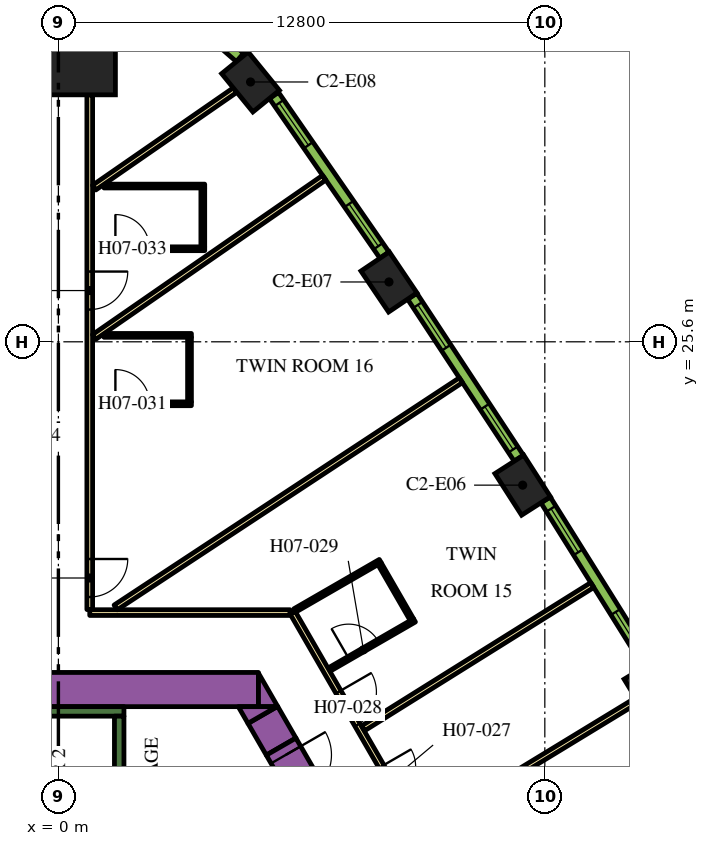
"""IFC4 building model, lengths in metres.
Left out: names, types, materials, properties, quantities, classifications, styles, units other than length and angle.
Written with IfcOpenShell. Run it as: python <this file> out.ifc"""

import sys

from ifc_helpers import new_model, si_unit, direction, frame, frame_2d, origin, origin_2d, place, context, subcontext, project, spatial, polyline, rectangle, outline, extrude, element, fill, save


model = new_model("IFC4")
c1 = context("Model", 3, precision=1e-05, world=origin(), true_north=direction((0.0, 1.0)))
c2 = subcontext(c1, "Body", "Model", "MODEL_VIEW")
j1 = project(units=[si_unit("LENGTHUNIT", "METRE"), si_unit("PLANEANGLEUNIT", "RADIAN")], contexts=[c1])
p1 = place(None, origin())
s1 = spatial("IfcSite", under=j1, at=p1, CompositionType="ELEMENT")
p2 = place(p1, origin())
s2 = spatial("IfcBuilding", under=s1, at=p2, CompositionType="ELEMENT")
p3 = place(p2, frame((0.0, 0.0, 103.2)))
s3 = spatial("IfcBuildingStorey", under=s2, at=p3, CompositionType="ELEMENT", Elevation=103.2)
p4 = place(p3, frame((0.0, 33.598, 0.0), z_axis=(0.0, 0.0, 1.0), x_axis=(0.0, 1.0, 0.0)))
e1 = element("IfcColumn", 1, at=p4, inside=s3, PredefinedType="COLUMN", context=c2, shape_type="SweptSolid", body=[
    extrude(rectangle(XDim=3.0, YDim=3.0, at=origin_2d()), origin(), (0.0, 0.0, 1.0), 3.9),
])
for number, where, z_axis, x_axis in (
    (2, (15.609, 16.402, 0.0), (0.0, 0.0, 1.0), (-0.52, 0.854, 0.0)),
    (3, (12.217, 21.828, 0.0), (0.0, 0.0, 1.0), (-0.54, 0.842, 0.0)),
    (4, (8.699, 27.174, 0.0), (0.0, 0.0, 1.0), (-0.559, 0.829, 0.0)),
    (5, (5.056, 32.437, 0.0), (0.0, 0.0, 1.0), (-0.632, 0.775, 0.0)),
):
    element("IfcColumn", number, at=place(p3, frame(where, z_axis=z_axis, x_axis=x_axis)), inside=s3, PredefinedType="COLUMN", context=c2, shape_type="SweptSolid", body=[
        extrude(rectangle(XDim=1.3, YDim=0.9, at=origin_2d()), origin(), (0.0, 0.0, 1.0), 3.9),
    ])
p5 = place(p3, frame((-4.224, 16.45, 0.0), z_axis=(0.0, 0.0, 1.0), x_axis=(1.0, 0.0, 0.0)))
e6 = element("IfcWall", 6, at=p5, inside=s3, PredefinedType="SOLIDWALL", context=c2, shape_type="SweptSolid", body=[
    extrude(rectangle(XDim=9.488, YDim=0.9, at=frame_2d((4.744, 0.0))), origin(), (0.0, 0.0, 1.0), 3.9),
])
p6 = place(p3, origin())
e7 = element("IfcWall", 7, at=p6, inside=s3, PredefinedType="SOLIDWALL", context=c2, shape_type="SweptSolid", body=[
    extrude(outline(polyline([(5.265, 16.0), (5.265, 16.88), (5.773, 16.0), (5.265, 16.0)])), origin(), (0.0, 0.0, 1.0), 3.9),
])
p7 = place(p3, frame((5.861, 14.949, 0.0), z_axis=(0.0, 0.0, 1.0), x_axis=(-0.50011719232, 0.865957732194, 0.0)))
e8 = element("IfcWall", 8, at=p7, inside=s3, PredefinedType="SOLIDWALL", context=c2, shape_type="SweptSolid", body=[
    extrude(rectangle(XDim=0.964, YDim=0.9, at=frame_2d((0.482, 0.0))), origin(), (0.0, 0.0, 1.0), 3.9),
])
e9 = element("IfcWall", 9, at=p6, inside=s3, PredefinedType="SOLIDWALL", context=c2, shape_type="SweptSolid", body=[
    extrude(outline(polyline([(4.734, 16.0), (5.75, 16.0), (4.988, 15.56), (4.734, 16.0)])), origin(), (0.0, 0.0, 1.0), 3.9),
])
p8 = place(p3, frame((-1.725, 15.875, 0.0), z_axis=(0.0, 0.0, 1.0), x_axis=(1.0, 0.0, 0.0)))
e10 = element("IfcWall", 10, at=p8, inside=s3, PredefinedType="SOLIDWALL", context=c2, shape_type="SweptSolid", body=[
    extrude(rectangle(XDim=3.45, YDim=0.25, at=frame_2d((1.725, 0.0))), origin(), (0.0, 0.0, 1.0), 3.9),
])
p9 = place(p3, frame((1.6, 8.95, 0.0), z_axis=(0.0, 0.0, 1.0), x_axis=(0.0, 1.0, 0.0)))
e11 = element("IfcWall", 11, at=p9, inside=s3, PredefinedType="SOLIDWALL", context=c2, shape_type="SweptSolid", body=[
    extrude(rectangle(XDim=6.8, YDim=0.25, at=frame_2d((3.4, 0.0))), origin(), (0.0, 0.0, 1.0), 3.9),
])
p10 = place(p3, frame((5.861, 14.948, 0.0), z_axis=(0.0, 0.0, 1.0), x_axis=(0.500062241894, -0.865989465428, 0.0)))
e12 = element("IfcWall", 12, at=p10, inside=s3, PredefinedType="SOLIDWALL", context=c2, shape_type="SweptSolid", body=[
    extrude(rectangle(XDim=1.7, YDim=0.9, at=frame_2d((0.85, 0.0))), origin(), (0.0, 0.0, 1.0), 3.9),
])
p11 = place(p10, frame((0.25, 0.0, 0.0)))
e13 = element("IfcOpeningElement", 13, at=p11, cuts=e12, PredefinedType="OPENING", context=c2, shape_type="SweptSolid", body=[
    extrude(rectangle(XDim=1.2, YDim=2.1, at=frame_2d((0.6, 1.05))), frame((0.0, 0.46, 0.0), z_axis=(0.0, -1.0, 0.0), x_axis=(1.0, 0.0, 0.0)), (0.0, 0.0, 1.0), 0.92),
])
p12 = place(p3, frame((6.163, 18.475, 0.0), z_axis=(0.0, 0.0, 1.0), x_axis=(0.500001317485, -0.866024643133, 0.0)))
e14 = element("IfcWall", 14, at=p12, inside=s3, PredefinedType="PARTITIONING", context=c2, shape_type="SweptSolid", body=[
    extrude(rectangle(XDim=25.767, YDim=0.15, at=frame_2d((12.883, 0.0))), origin(), (0.0, 0.0, 1.0), 2.75),
])
p13 = place(p12, frame((24.241, 0.0, 0.0)))
e15 = element("IfcOpeningElement", 15, at=p13, cuts=e14, PredefinedType="OPENING", context=c2, shape_type="SweptSolid", body=[
    extrude(rectangle(XDim=1.0, YDim=2.1, at=frame_2d((0.5, 1.05))), frame((0.0, 0.085, 0.0), z_axis=(0.0, -1.0, 0.0), x_axis=(1.0, 0.0, 0.0)), (0.0, 0.0, 1.0), 0.17),
])
p14 = place(p12, frame((13.144, 0.0, 0.0)))
e16 = element("IfcOpeningElement", 16, at=p14, cuts=e14, PredefinedType="OPENING", context=c2, shape_type="SweptSolid", body=[
    extrude(rectangle(XDim=1.0, YDim=2.1, at=frame_2d((0.5, 1.05))), frame((0.0, 0.085, 0.0), z_axis=(0.0, -1.0, 0.0), x_axis=(1.0, 0.0, 0.0)), (0.0, 0.0, 1.0), 0.17),
])
p15 = place(p12, frame((11.592, 0.0, 0.0)))
e17 = element("IfcOpeningElement", 17, at=p15, cuts=e14, PredefinedType="OPENING", context=c2, shape_type="SweptSolid", body=[
    extrude(rectangle(XDim=1.1, YDim=2.1, at=frame_2d((0.55, 1.05))), frame((0.0, 0.085, 0.0), z_axis=(0.0, -1.0, 0.0), x_axis=(1.0, 0.0, 0.0)), (0.0, 0.0, 1.0), 0.17),
])
p16 = place(p12, frame((4.674, 0.0, 0.0)))
e18 = element("IfcOpeningElement", 18, at=p16, cuts=e14, PredefinedType="OPENING", context=c2, shape_type="SweptSolid", body=[
    extrude(rectangle(XDim=0.9, YDim=2.1, at=frame_2d((0.45, 1.05))), frame((0.0, 0.085, 0.0), z_axis=(0.0, -1.0, 0.0), x_axis=(1.0, 0.0, 0.0)), (0.0, 0.0, 1.0), 0.17),
])
p17 = place(p12, frame((2.411, 0.0, 0.0)))
e19 = element("IfcOpeningElement", 19, at=p17, cuts=e14, PredefinedType="OPENING", context=c2, shape_type="SweptSolid", body=[
    extrude(rectangle(XDim=1.0, YDim=2.1, at=frame_2d((0.5, 1.05))), frame((0.0, 0.085, 0.0), z_axis=(0.0, -1.0, 0.0), x_axis=(1.0, 0.0, 0.0)), (0.0, 0.0, 1.0), 0.17),
])
p18 = place(p3, frame((0.825, 18.475, 0.0), z_axis=(0.0, 0.0, 1.0), x_axis=(1.0, 0.0, 0.0)))
e20 = element("IfcWall", 20, at=p18, inside=s3, PredefinedType="PARTITIONING", context=c2, shape_type="SweptSolid", body=[
    extrude(rectangle(XDim=5.268, YDim=0.15, at=frame_2d((2.634, 0.0))), origin(), (0.0, 0.0, 1.0), 2.75),
])
p19 = place(p3, frame((0.825, 32.098, 0.0), z_axis=(0.0, 0.0, 1.0), x_axis=(0.0, -1.0, 0.0)))
e21 = element("IfcWall", 21, at=p19, inside=s3, PredefinedType="PARTITIONING", context=c2, shape_type="SweptSolid", body=[
    extrude(rectangle(XDim=13.543, YDim=0.15, at=frame_2d((6.772, 0.0))), origin(), (0.0, 0.0, 1.0), 2.75),
])
p20 = place(p19, frame((12.213, 0.0, 0.0)))
e22 = element("IfcOpeningElement", 22, at=p20, cuts=e21, PredefinedType="OPENING", context=c2, shape_type="SweptSolid", body=[
    extrude(rectangle(XDim=1.0, YDim=2.1, at=frame_2d((0.5, 1.05))), frame((0.0, 0.085, 0.0), z_axis=(0.0, -1.0, 0.0), x_axis=(1.0, 0.0, 0.0)), (0.0, 0.0, 1.0), 0.17),
])
p21 = place(p19, frame((4.65, 0.0, 0.0)))
e23 = element("IfcOpeningElement", 23, at=p21, cuts=e21, PredefinedType="OPENING", context=c2, shape_type="SweptSolid", body=[
    extrude(rectangle(XDim=1.0, YDim=2.1, at=frame_2d((0.5, 1.05))), frame((0.0, 0.085, 0.0), z_axis=(0.0, -1.0, 0.0), x_axis=(1.0, 0.0, 0.0)), (0.0, 0.0, 1.0), 0.17),
])
p22 = place(p3, frame((6.994, 29.917, 0.0), z_axis=(0.0, 0.0, 1.0), x_axis=(-0.822255462494, -0.569118576747, 0.0)))
e24 = element("IfcWall", 24, at=p22, inside=s3, PredefinedType="PARTITIONING", context=c2, shape_type="SweptSolid", body=[
    extrude(rectangle(XDim=7.362, YDim=0.15, at=frame_2d((3.681, 0.0))), origin(), (0.0, 0.0, 1.0), 2.75),
])
p23 = place(p3, frame((10.592, 24.589, 0.0), z_axis=(0.0, 0.0, 1.0), x_axis=(-0.835337323748, -0.549737715236, 0.0)))
e25 = element("IfcWall", 25, at=p23, inside=s3, PredefinedType="PARTITIONING", context=c2, shape_type="SweptSolid", body=[
    extrude(rectangle(XDim=10.875, YDim=0.15, at=frame_2d((5.438, 0.0))), origin(), (0.0, 0.0, 1.0), 2.75),
])
p24 = place(p3, frame((4.649, 32.223, 0.0), z_axis=(0.0, 0.0, 1.0), x_axis=(-0.822262349475, -0.569108626394, 0.0)))
e26 = element("IfcWall", 26, at=p24, inside=s3, PredefinedType="PARTITIONING", context=c2, shape_type="SweptSolid", body=[
    extrude(rectangle(XDim=4.51, YDim=0.15, at=frame_2d((2.255, 0.0))), origin(), (0.0, 0.0, 1.0), 2.75),
])
p25 = place(p3, frame((14.049, 19.2, 0.0), z_axis=(0.0, 0.0, 1.0), x_axis=(-0.847955867271, -0.530066832731, 0.0)))
e27 = element("IfcWall", 27, at=p25, inside=s3, PredefinedType="PARTITIONING", context=c2, shape_type="SweptSolid", body=[
    extrude(rectangle(XDim=7.111, YDim=0.15, at=frame_2d((3.556, 0.0))), origin(), (0.0, 0.0, 1.0), 2.75),
])
p26 = place(p3, frame((15.225, 16.167, 0.0), z_axis=(0.0, 0.0, 1.0), x_axis=(-0.854088713274, -0.520127359266, 0.0)))
e28 = element("IfcWall", 28, at=p26, inside=s3, PredefinedType="PARTITIONING", context=c2, shape_type="SweptSolid", body=[
    extrude(rectangle(XDim=6.611, YDim=0.15, at=frame_2d((3.305, 0.0))), origin(), (0.0, 0.0, 1.0), 2.75),
])
p27 = place(p3, frame((7.118, 16.971, 0.0), z_axis=(0.0, 0.0, 1.0), x_axis=(0.866021400173, 0.500006934395, 0.0)))
e29 = element("IfcWall", 29, at=p27, inside=s3, PredefinedType="PARTITIONING", context=c2, shape_type="SweptSolid", body=[
    extrude(rectangle(XDim=2.6, YDim=0.1, at=frame_2d((1.3, 0.0))), origin(), (0.0, 0.0, 1.0), 2.75),
])
p28 = place(p27, frame((0.6, 0.0, 0.0)))
e30 = element("IfcOpeningElement", 30, at=p28, cuts=e29, PredefinedType="OPENING", context=c2, shape_type="SweptSolid", body=[
    extrude(rectangle(XDim=0.9, YDim=2.1, at=frame_2d((0.45, 1.05))), frame((0.0, 0.06, 0.0), z_axis=(0.0, -1.0, 0.0), x_axis=(1.0, 0.0, 0.0)), (0.0, 0.0, 1.0), 0.12),
])
p29 = place(p3, frame((9.302, 18.289, 0.0), z_axis=(0.0, 0.0, 1.0), x_axis=(-0.500062241894, 0.865989465428, 0.0)))
e31 = element("IfcWall", 31, at=p29, inside=s3, PredefinedType="PARTITIONING", context=c2, shape_type="SweptSolid", body=[
    extrude(rectangle(XDim=1.7, YDim=0.1, at=frame_2d((0.85, 0.0))), origin(), (0.0, 0.0, 1.0), 2.75),
])
p30 = place(p3, frame((6.218, 18.53, 0.0), z_axis=(0.0, 0.0, 1.0), x_axis=(0.865997922154, 0.500047596559, 0.0)))
e32 = element("IfcWall", 32, at=p30, inside=s3, PredefinedType="PARTITIONING", context=c2, shape_type="SweptSolid", body=[
    extrude(rectangle(XDim=2.6, YDim=0.1, at=frame_2d((1.3, 0.0))), origin(), (0.0, 0.0, 1.0), 2.75),
])
p31 = place(p3, frame((0.9, 23.969, 0.0), z_axis=(0.0, 0.0, 1.0), x_axis=(1.0, 0.0, 0.0)))
e33 = element("IfcWall", 33, at=p31, inside=s3, PredefinedType="PARTITIONING", context=c2, shape_type="SweptSolid", body=[
    extrude(rectangle(XDim=2.6, YDim=0.1, at=frame_2d((1.3, 0.0))), origin(), (0.0, 0.0, 1.0), 2.75),
])
p32 = place(p31, frame((0.6, 0.0, 0.0)))
e34 = element("IfcOpeningElement", 34, at=p32, cuts=e33, PredefinedType="OPENING", context=c2, shape_type="SweptSolid", body=[
    extrude(rectangle(XDim=0.9, YDim=2.1, at=frame_2d((0.45, 1.05))), frame((0.0, 0.06, 0.0), z_axis=(0.0, -1.0, 0.0), x_axis=(1.0, 0.0, 0.0)), (0.0, 0.0, 1.0), 0.12),
])
p33 = place(p3, frame((3.45, 24.019, 0.0), z_axis=(0.0, 0.0, 1.0), x_axis=(0.0, 1.0, 0.0)))
e35 = element("IfcWall", 35, at=p33, inside=s3, PredefinedType="PARTITIONING", context=c2, shape_type="SweptSolid", body=[
    extrude(rectangle(XDim=1.7, YDim=0.1, at=frame_2d((0.85, 0.0))), origin(), (0.0, 0.0, 1.0), 2.75),
])
p34 = place(p3, frame((1.2, 25.769, 0.0), z_axis=(0.0, 0.0, 1.0), x_axis=(1.0, 0.0, 0.0)))
e36 = element("IfcWall", 36, at=p34, inside=s3, PredefinedType="PARTITIONING", context=c2, shape_type="SweptSolid", body=[
    extrude(rectangle(XDim=2.3, YDim=0.1, at=frame_2d((1.15, 0.0))), origin(), (0.0, 0.0, 1.0), 2.75),
])
p35 = place(p3, frame((0.9, 28.048, 0.0), z_axis=(0.0, 0.0, 1.0), x_axis=(1.0, 0.0, 0.0)))
e37 = element("IfcWall", 37, at=p35, inside=s3, PredefinedType="PARTITIONING", context=c2, shape_type="SweptSolid", body=[
    extrude(rectangle(XDim=2.95, YDim=0.1, at=frame_2d((1.475, 0.0))), origin(), (0.0, 0.0, 1.0), 2.75),
])
p36 = place(p35, frame((0.6, 0.0, 0.0)))
e38 = element("IfcOpeningElement", 38, at=p36, cuts=e37, PredefinedType="OPENING", context=c2, shape_type="SweptSolid", body=[
    extrude(rectangle(XDim=0.9, YDim=2.1, at=frame_2d((0.45, 1.05))), frame((0.0, 0.06, 0.0), z_axis=(0.0, -1.0, 0.0), x_axis=(1.0, 0.0, 0.0)), (0.0, 0.0, 1.0), 0.12),
])
p37 = place(p3, frame((3.8, 28.098, 0.0), z_axis=(0.0, 0.0, 1.0), x_axis=(0.0, 1.0, 0.0)))
e39 = element("IfcWall", 39, at=p37, inside=s3, PredefinedType="PARTITIONING", context=c2, shape_type="SweptSolid", body=[
    extrude(rectangle(XDim=1.55, YDim=0.1, at=frame_2d((0.775, 0.0))), origin(), (0.0, 0.0, 1.0), 2.75),
])
p38 = place(p3, frame((1.2, 29.698, 0.0), z_axis=(0.0, 0.0, 1.0), x_axis=(1.0, 0.0, 0.0)))
e40 = element("IfcWall", 40, at=p38, inside=s3, PredefinedType="PARTITIONING", context=c2, shape_type="SweptSolid", body=[
    extrude(rectangle(XDim=2.65, YDim=0.1, at=frame_2d((1.325, 0.0))), origin(), (0.0, 0.0, 1.0), 2.75),
])
p39 = place(p3, frame((15.524, 17.114, 0.0), z_axis=(0.0, 0.0, 1.0), x_axis=(-0.530072082134, 0.847952585787, 0.0)))
e41 = element("IfcWall", 41, at=p39, inside=s3, PredefinedType="SOLIDWALL", context=c2, shape_type="SweptSolid", body=[
    extrude(rectangle(XDim=5.1, YDim=0.29, at=frame_2d((2.55, 0.0))), origin(), (0.0, 0.0, 1.0), 3.65),
])
p40 = place(p39, frame((0.273, 0.0, 0.9)))
e42 = element("IfcOpeningElement", 42, at=p40, cuts=e41, PredefinedType="OPENING", context=c2, shape_type="SweptSolid", body=[
    extrude(rectangle(XDim=1.35, YDim=2.15, at=frame_2d((0.675, 1.075))), frame((0.0, 0.155, 0.0), z_axis=(0.0, -1.0, 0.0), x_axis=(1.0, 0.0, 0.0)), (0.0, 0.0, 1.0), 0.31),
])
p41 = place(p39, frame((3.478, 0.0, 0.9)))
e43 = element("IfcOpeningElement", 43, at=p41, cuts=e41, PredefinedType="OPENING", context=c2, shape_type="SweptSolid", body=[
    extrude(rectangle(XDim=1.35, YDim=2.15, at=frame_2d((0.675, 1.075))), frame((0.0, 0.155, 0.0), z_axis=(0.0, -1.0, 0.0), x_axis=(1.0, 0.0, 0.0)), (0.0, 0.0, 1.0), 0.31),
])
p42 = place(p3, frame((12.115, 22.539, 0.0), z_axis=(0.0, 0.0, 1.0), x_axis=(-0.549741341923, 0.835334937005, 0.0)))
e44 = element("IfcWall", 44, at=p42, inside=s3, PredefinedType="SOLIDWALL", context=c2, shape_type="SweptSolid", body=[
    extrude(rectangle(XDim=5.1, YDim=0.29, at=frame_2d((2.55, 0.0))), origin(), (0.0, 0.0, 1.0), 3.65),
])
p43 = place(p42, frame((0.273, 0.0, 0.9)))
e45 = element("IfcOpeningElement", 45, at=p43, cuts=e44, PredefinedType="OPENING", context=c2, shape_type="SweptSolid", body=[
    extrude(rectangle(XDim=1.35, YDim=2.15, at=frame_2d((0.675, 1.075))), frame((0.0, 0.155, 0.0), z_axis=(0.0, -1.0, 0.0), x_axis=(1.0, 0.0, 0.0)), (0.0, 0.0, 1.0), 0.31),
])
p44 = place(p42, frame((3.478, 0.0, 0.9)))
e46 = element("IfcOpeningElement", 46, at=p44, cuts=e44, PredefinedType="OPENING", context=c2, shape_type="SweptSolid", body=[
    extrude(rectangle(XDim=1.35, YDim=2.15, at=frame_2d((0.675, 1.075))), frame((0.0, 0.155, 0.0), z_axis=(0.0, -1.0, 0.0), x_axis=(1.0, 0.0, 0.0)), (0.0, 0.0, 1.0), 0.31),
])
p45 = place(p3, frame((8.58, 27.882, 0.0), z_axis=(0.0, 0.0, 1.0), x_axis=(-0.569113019126, 0.822259309136, 0.0)))
e47 = element("IfcWall", 47, at=p45, inside=s3, PredefinedType="SOLIDWALL", context=c2, shape_type="SweptSolid", body=[
    extrude(rectangle(XDim=5.107, YDim=0.29, at=frame_2d((2.553, 0.0))), origin(), (0.0, 0.0, 1.0), 3.65),
])
p46 = place(p45, frame((0.285, 0.0, 0.9)))
e48 = element("IfcOpeningElement", 48, at=p46, cuts=e47, PredefinedType="OPENING", context=c2, shape_type="SweptSolid", body=[
    extrude(rectangle(XDim=1.35, YDim=2.15, at=frame_2d((0.675, 1.075))), frame((0.0, 0.155, 0.0), z_axis=(0.0, -1.0, 0.0), x_axis=(1.0, 0.0, 0.0)), (0.0, 0.0, 1.0), 0.31),
])
p47 = place(p45, frame((3.516, 0.0, 0.9)))
e49 = element("IfcOpeningElement", 49, at=p47, cuts=e47, PredefinedType="OPENING", context=c2, shape_type="SweptSolid", body=[
    extrude(rectangle(XDim=1.35, YDim=2.15, at=frame_2d((0.675, 1.075))), frame((0.0, 0.155, 0.0), z_axis=(0.0, -1.0, 0.0), x_axis=(1.0, 0.0, 0.0)), (0.0, 0.0, 1.0), 0.31),
])
p48 = place(p3, frame((4.778, 33.082, 0.0), z_axis=(0.0, 0.0, 1.0), x_axis=(-0.754882764627, 0.655859749999, 0.0)))
e50 = element("IfcWall", 50, at=p48, inside=s3, PredefinedType="SOLIDWALL", context=c2, shape_type="SweptSolid", body=[
    extrude(rectangle(XDim=1.82, YDim=0.29, at=frame_2d((0.91, 0.0))), origin(), (0.0, 0.0, 1.0), 3.65),
])
p49 = place(p48, frame((0.46, 0.0, 0.9)))
e51 = element("IfcOpeningElement", 51, at=p49, cuts=e50, PredefinedType="OPENING", context=c2, shape_type="SweptSolid", body=[
    extrude(rectangle(XDim=0.9, YDim=2.15, at=frame_2d((0.45, 1.075))), frame((0.0, 0.155, 0.0), z_axis=(0.0, -1.0, 0.0), x_axis=(1.0, 0.0, 0.0)), (0.0, 0.0, 1.0), 0.31),
])
p50 = place(p11, origin())
e52 = element("IfcDoor", 52, at=p50, inside=s3, OperationType="SINGLE_SWING_LEFT", PredefinedType="DOOR", context=c2, shape_type="SweptSolid", body=[
    extrude(rectangle(XDim=1.2, YDim=2.1, at=frame_2d((0.6, 1.05))), frame((0.0, 0.025, 0.0), z_axis=(0.0, -1.0, 0.0), x_axis=(1.0, 0.0, 0.0)), (0.0, 0.0, 1.0), 0.05),
])
fill(e13, e52)
p51 = place(p16, origin())
e53 = element("IfcDoor", 53, at=p51, inside=s3, OperationType="SINGLE_SWING_RIGHT", PredefinedType="DOOR", context=c2, shape_type="SweptSolid", body=[
    extrude(rectangle(XDim=0.9, YDim=2.1, at=frame_2d((0.45, 1.05))), frame((0.0, 0.025, 0.0), z_axis=(0.0, -1.0, 0.0), x_axis=(1.0, 0.0, 0.0)), (0.0, 0.0, 1.0), 0.05),
])
fill(e18, e53)
p52 = place(p17, origin())
e54 = element("IfcDoor", 54, at=p52, inside=s3, OperationType="SINGLE_SWING_RIGHT", PredefinedType="DOOR", context=c2, shape_type="SweptSolid", body=[
    extrude(rectangle(XDim=1.0, YDim=2.1, at=frame_2d((0.5, 1.05))), frame((0.0, 0.025, 0.0), z_axis=(0.0, -1.0, 0.0), x_axis=(1.0, 0.0, 0.0)), (0.0, 0.0, 1.0), 0.05),
])
fill(e19, e54)
p53 = place(p28, origin())
e55 = element("IfcDoor", 55, at=p53, inside=s3, OperationType="SINGLE_SWING_RIGHT", PredefinedType="DOOR", context=c2, shape_type="SweptSolid", body=[
    extrude(rectangle(XDim=0.9, YDim=2.1, at=frame_2d((0.45, 1.05))), frame((0.0, 0.025, 0.0), z_axis=(0.0, -1.0, 0.0), x_axis=(1.0, 0.0, 0.0)), (0.0, 0.0, 1.0), 0.05),
])
fill(e30, e55)
p54 = place(p20, origin())
e56 = element("IfcDoor", 56, at=p54, inside=s3, OperationType="SINGLE_SWING_RIGHT", PredefinedType="DOOR", context=c2, shape_type="SweptSolid", body=[
    extrude(rectangle(XDim=1.0, YDim=2.1, at=frame_2d((0.5, 1.05))), frame((0.0, 0.025, 0.0), z_axis=(0.0, -1.0, 0.0), x_axis=(1.0, 0.0, 0.0)), (0.0, 0.0, 1.0), 0.05),
])
fill(e22, e56)
p55 = place(p32, origin())
e57 = element("IfcDoor", 57, at=p55, inside=s3, OperationType="SINGLE_SWING_LEFT", PredefinedType="DOOR", context=c2, shape_type="SweptSolid", body=[
    extrude(rectangle(XDim=0.9, YDim=2.1, at=frame_2d((0.45, 1.05))), frame((0.0, 0.025, 0.0), z_axis=(0.0, -1.0, 0.0), x_axis=(1.0, 0.0, 0.0)), (0.0, 0.0, 1.0), 0.05),
])
fill(e34, e57)
p56 = place(p21, origin())
e58 = element("IfcDoor", 58, at=p56, inside=s3, OperationType="SINGLE_SWING_RIGHT", PredefinedType="DOOR", context=c2, shape_type="SweptSolid", body=[
    extrude(rectangle(XDim=1.0, YDim=2.1, at=frame_2d((0.5, 1.05))), frame((0.0, 0.025, 0.0), z_axis=(0.0, -1.0, 0.0), x_axis=(1.0, 0.0, 0.0)), (0.0, 0.0, 1.0), 0.05),
])
fill(e23, e58)
p57 = place(p36, origin())
e59 = element("IfcDoor", 59, at=p57, inside=s3, OperationType="SINGLE_SWING_LEFT", PredefinedType="DOOR", context=c2, shape_type="SweptSolid", body=[
    extrude(rectangle(XDim=0.9, YDim=2.1, at=frame_2d((0.45, 1.05))), frame((0.0, 0.025, 0.0), z_axis=(0.0, -1.0, 0.0), x_axis=(1.0, 0.0, 0.0)), (0.0, 0.0, 1.0), 0.05),
])
fill(e38, e59)
p58 = place(p40, origin())
e60 = element("IfcWindow", 60, at=p58, inside=s3, PartitioningType="DOUBLE_PANEL_VERTICAL", PredefinedType="WINDOW", context=c2, shape_type="SweptSolid", body=[
    extrude(rectangle(XDim=1.35, YDim=2.15, at=frame_2d((0.675, 1.075))), frame((0.0, 0.015, 0.0), z_axis=(0.0, -1.0, 0.0), x_axis=(1.0, 0.0, 0.0)), (0.0, 0.0, 1.0), 0.06),
])
fill(e42, e60)
p59 = place(p41, origin())
e61 = element("IfcWindow", 61, at=p59, inside=s3, PartitioningType="DOUBLE_PANEL_VERTICAL", PredefinedType="WINDOW", context=c2, shape_type="SweptSolid", body=[
    extrude(rectangle(XDim=1.35, YDim=2.15, at=frame_2d((0.675, 1.075))), frame((0.0, 0.015, 0.0), z_axis=(0.0, -1.0, 0.0), x_axis=(1.0, 0.0, 0.0)), (0.0, 0.0, 1.0), 0.06),
])
fill(e43, e61)
p60 = place(p43, origin())
e62 = element("IfcWindow", 62, at=p60, inside=s3, PartitioningType="DOUBLE_PANEL_VERTICAL", PredefinedType="WINDOW", context=c2, shape_type="SweptSolid", body=[
    extrude(rectangle(XDim=1.35, YDim=2.15, at=frame_2d((0.675, 1.075))), frame((0.0, 0.015, 0.0), z_axis=(0.0, -1.0, 0.0), x_axis=(1.0, 0.0, 0.0)), (0.0, 0.0, 1.0), 0.06),
])
fill(e45, e62)
p61 = place(p44, origin())
e63 = element("IfcWindow", 63, at=p61, inside=s3, PartitioningType="DOUBLE_PANEL_VERTICAL", PredefinedType="WINDOW", context=c2, shape_type="SweptSolid", body=[
    extrude(rectangle(XDim=1.35, YDim=2.15, at=frame_2d((0.675, 1.075))), frame((0.0, 0.015, 0.0), z_axis=(0.0, -1.0, 0.0), x_axis=(1.0, 0.0, 0.0)), (0.0, 0.0, 1.0), 0.06),
])
fill(e46, e63)
p62 = place(p46, origin())
e64 = element("IfcWindow", 64, at=p62, inside=s3, PartitioningType="DOUBLE_PANEL_VERTICAL", PredefinedType="WINDOW", context=c2, shape_type="SweptSolid", body=[
    extrude(rectangle(XDim=1.35, YDim=2.15, at=frame_2d((0.675, 1.075))), frame((0.0, 0.015, 0.0), z_axis=(0.0, -1.0, 0.0), x_axis=(1.0, 0.0, 0.0)), (0.0, 0.0, 1.0), 0.06),
])
fill(e48, e64)
p63 = place(p47, origin())
e65 = element("IfcWindow", 65, at=p63, inside=s3, PartitioningType="DOUBLE_PANEL_VERTICAL", PredefinedType="WINDOW", context=c2, shape_type="SweptSolid", body=[
    extrude(rectangle(XDim=1.35, YDim=2.15, at=frame_2d((0.675, 1.075))), frame((0.0, 0.015, 0.0), z_axis=(0.0, -1.0, 0.0), x_axis=(1.0, 0.0, 0.0)), (0.0, 0.0, 1.0), 0.06),
])
fill(e49, e65)
save(model, sys.argv[1])
